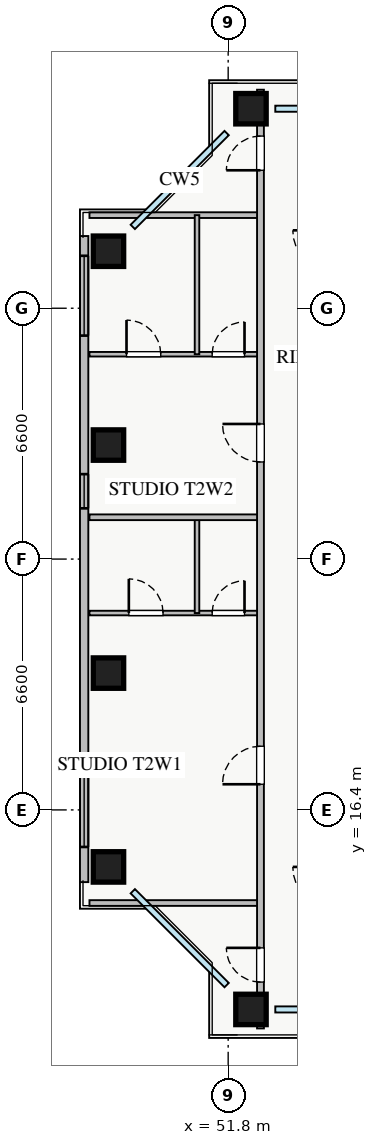
"""IFC4 building model, lengths in metres.
Left out: names, types, materials, properties, quantities, classifications, styles, units other than length and angle.
Written with IfcOpenShell. Run it as: python <this file> out.ifc"""

import sys

from ifc_helpers import new_model, si_unit, direction, frame, frame_2d, origin, origin_2d, place, context, subcontext, project, spatial, rectangle, extrude, source, transform, mapped, element, fill, save


model = new_model("IFC4")
c1 = context("Model", 3, precision=1e-05, world=origin(), true_north=direction((0.0, 1.0)))
c2 = subcontext(c1, "Body", "Model", "MODEL_VIEW")
j1 = project(units=[si_unit("LENGTHUNIT", "METRE"), si_unit("PLANEANGLEUNIT", "RADIAN")], contexts=[c1])
p1 = place(None, origin())
s1 = spatial("IfcSite", under=j1, at=p1, CompositionType="ELEMENT")
p2 = place(p1, origin())
s2 = spatial("IfcBuilding", under=s1, at=p2, CompositionType="ELEMENT")
p3 = place(p2, frame((0.0, 0.0, 97.0)))
s3 = spatial("IfcBuildingStorey", under=s2, at=p3, CompositionType="ELEMENT", Elevation=97.0)
m1 = source(origin(), c2, "Body", "SweptSolid", [
    extrude(rectangle(XDim=0.8, YDim=0.8, at=origin_2d()), origin(), (0.0, 0.0, 1.0), 3.25),
])
for number, where, z_axis, x_axis in (
    (1, (52.4, 11.15, 0.0), (0.0, 0.0, 1.0), (1.0, 0.0, 0.0)),
    (2, (52.4, 34.85, 0.0), (0.0, 0.0, 1.0), (1.0, 0.0, 0.0)),
    (3, (48.65, 14.9, 0.0), (0.0, 0.0, 1.0), (1.0, 0.0, 0.0)),
    (4, (48.65, 20.0, 0.0), (0.0, 0.0, 1.0), (1.0, 0.0, 0.0)),
    (5, (48.65, 26.0, 0.0), (0.0, 0.0, 1.0), (1.0, 0.0, 0.0)),
    (6, (48.65, 31.1, 0.0), (0.0, 0.0, 1.0), (1.0, 0.0, 0.0)),
):
    element("IfcColumn", number, at=place(p3, frame(where, z_axis=z_axis, x_axis=x_axis)), inside=s3, PredefinedType="COLUMN", context=c2, shape_type="MappedRepresentation", body=[
        mapped(m1, transform((0.0, 0.0, 0.0), x_axis=(1.0, 0.0, 0.0), y_axis=(0.0, 1.0, 0.0), z_axis=(0.0, 0.0, 1.0), scale=1.0)),
    ])
p4 = place(p3, frame((48.01, 14.5, 0.0), z_axis=(0.0, 0.0, 1.0), x_axis=(0.0, 1.0, 0.0)))
e7 = element("IfcWall", 7, at=p4, inside=s3, PredefinedType="STANDARD", context=c2, shape_type="SweptSolid", body=[
    extrude(rectangle(XDim=17.0, YDim=0.22, at=frame_2d((8.5, 0.0))), origin(), (0.0, 0.0, 1.0), 2.61),
])
p5 = place(p4, frame((0.925, 0.0, 0.9)))
e8 = element("IfcOpeningElement", 8, at=p5, cuts=e7, PredefinedType="OPENING", context=c2, shape_type="SweptSolid", body=[
    extrude(rectangle(XDim=2.4, YDim=1.48, at=frame_2d((1.2, 0.74))), frame((0.0, 0.12, 0.0), z_axis=(0.0, -1.0, 0.0), x_axis=(1.0, 0.0, 0.0)), (0.0, 0.0, 1.0), 0.24),
])
p6 = place(p4, frame((14.38, 0.0, 0.9)))
e9 = element("IfcOpeningElement", 9, at=p6, cuts=e7, PredefinedType="OPENING", context=c2, shape_type="SweptSolid", body=[
    extrude(rectangle(XDim=2.1, YDim=1.5, at=frame_2d((1.05, 0.75))), frame((0.0, 0.12, 0.0), z_axis=(0.0, -1.0, 0.0), x_axis=(1.0, 0.0, 0.0)), (0.0, 0.0, 1.0), 0.24),
])
p7 = place(p4, frame((9.835, 0.0, 0.9)))
e10 = element("IfcOpeningElement", 10, at=p7, cuts=e7, PredefinedType="OPENING", context=c2, shape_type="SweptSolid", body=[
    extrude(rectangle(XDim=0.9, YDim=1.2, at=frame_2d((0.45, 0.6))), frame((0.0, 0.12, 0.0), z_axis=(0.0, -1.0, 0.0), x_axis=(1.0, 0.0, 0.0)), (0.0, 0.0, 1.0), 0.24),
])
for number, where, z_axis, x_axis in (
    (11, (48.15, 32.05, 0.0), (0.0, 0.0, 1.0), (1.0, 0.0, 0.0)),
    (12, (48.15, 13.95, 0.0), (0.0, 0.0, 1.0), (1.0, 0.0, 0.0)),
):
    element("IfcWall", number, at=place(p3, frame(where, z_axis=z_axis, x_axis=x_axis)), inside=s3, PredefinedType="PARTITIONING", context=c2, shape_type="SweptSolid", body=[
        extrude(rectangle(XDim=4.5, YDim=0.15, at=frame_2d((2.25, 0.0))), origin(), (0.0, 0.0, 1.0), 3.07),
    ])
p8 = place(p3, frame((48.15, 21.58, 0.0), z_axis=(0.0, 0.0, 1.0), x_axis=(1.0, 0.0, 0.0)))
e13 = element("IfcWall", 13, at=p8, inside=s3, PredefinedType="PLUMBINGWALL", context=c2, shape_type="SweptSolid", body=[
    extrude(rectangle(XDim=4.5, YDim=0.12, at=frame_2d((2.25, 0.0))), origin(), (0.0, 0.0, 1.0), 3.07),
])
p9 = place(p8, frame((1.036, 0.0, 0.0)))
e14 = element("IfcOpeningElement", 14, at=p9, cuts=e13, PredefinedType="OPENING", context=c2, shape_type="SweptSolid", body=[
    extrude(rectangle(XDim=0.9, YDim=2.05, at=frame_2d((0.45, 1.025))), frame((0.0, 0.07, 0.0), z_axis=(0.0, -1.0, 0.0), x_axis=(1.0, 0.0, 0.0)), (0.0, 0.0, 1.0), 0.14),
])
p10 = place(p8, frame((3.23, 0.0, 0.0)))
e15 = element("IfcOpeningElement", 15, at=p10, cuts=e13, PredefinedType="OPENING", context=c2, shape_type="SweptSolid", body=[
    extrude(rectangle(XDim=0.85, YDim=2.05, at=frame_2d((0.425, 1.025))), frame((0.0, 0.07, 0.0), z_axis=(0.0, -1.0, 0.0), x_axis=(1.0, 0.0, 0.0)), (0.0, 0.0, 1.0), 0.14),
])
p11 = place(p3, frame((50.98, 21.58, 0.0), z_axis=(0.0, 0.0, 1.0), x_axis=(0.0, 1.0, 0.0)))
e16 = element("IfcWall", 16, at=p11, inside=s3, PredefinedType="PLUMBINGWALL", context=c2, shape_type="SweptSolid", body=[
    extrude(rectangle(XDim=2.52, YDim=0.12, at=frame_2d((1.26, 0.0))), origin(), (0.0, 0.0, 1.0), 3.07),
])
p12 = place(p3, frame((48.15, 28.39, 0.0), z_axis=(0.0, 0.0, 1.0), x_axis=(1.0, 0.0, 0.0)))
e17 = element("IfcWall", 17, at=p12, inside=s3, PredefinedType="PLUMBINGWALL", context=c2, shape_type="SweptSolid", body=[
    extrude(rectangle(XDim=4.5, YDim=0.12, at=frame_2d((2.25, 0.0))), origin(), (0.0, 0.0, 1.0), 3.07),
])
p13 = place(p12, frame((0.975, 0.0, 0.0)))
e18 = element("IfcOpeningElement", 18, at=p13, cuts=e17, PredefinedType="OPENING", context=c2, shape_type="SweptSolid", body=[
    extrude(rectangle(XDim=0.9, YDim=2.05, at=frame_2d((0.45, 1.025))), frame((0.0, 0.07, 0.0), z_axis=(0.0, -1.0, 0.0), x_axis=(1.0, 0.0, 0.0)), (0.0, 0.0, 1.0), 0.14),
])
p14 = place(p12, frame((3.23, 0.0, 0.0)))
e19 = element("IfcOpeningElement", 19, at=p14, cuts=e17, PredefinedType="OPENING", context=c2, shape_type="SweptSolid", body=[
    extrude(rectangle(XDim=0.85, YDim=2.05, at=frame_2d((0.425, 1.025))), frame((0.0, 0.07, 0.0), z_axis=(0.0, -1.0, 0.0), x_axis=(1.0, 0.0, 0.0)), (0.0, 0.0, 1.0), 0.14),
])
p15 = place(p3, frame((50.98, 28.39, 0.0), z_axis=(0.0, 0.0, 1.0), x_axis=(0.0, 1.0, 0.0)))
e20 = element("IfcWall", 20, at=p15, inside=s3, PredefinedType="PLUMBINGWALL", context=c2, shape_type="SweptSolid", body=[
    extrude(rectangle(XDim=3.66, YDim=0.12, at=frame_2d((1.83, 0.0))), origin(), (0.0, 0.0, 1.0), 3.07),
])
p16 = place(p3, frame((48.15, 24.1, 0.0), z_axis=(0.0, 0.0, 1.0), x_axis=(1.0, 0.0, 0.0)))
e21 = element("IfcWall", 21, at=p16, inside=s3, PredefinedType="PARTITIONING", context=c2, shape_type="SweptSolid", body=[
    extrude(rectangle(XDim=4.5, YDim=0.15, at=frame_2d((2.25, 0.0))), origin(), (0.0, 0.0, 1.0), 3.07),
])
p17 = place(p3, frame((52.65, 10.65, 0.0), z_axis=(0.0, 0.0, 1.0), x_axis=(0.0, 1.0, 0.0)))
e22 = element("IfcWall", 22, at=p17, inside=s3, PredefinedType="PARTITIONING", context=c2, shape_type="SweptSolid", body=[
    extrude(rectangle(XDim=24.7, YDim=0.18, at=frame_2d((12.35, 0.0))), origin(), (0.0, 0.0, 1.0), 2.615),
])
p18 = place(p17, frame((22.58, 0.0, 0.0)))
e23 = element("IfcOpeningElement", 23, at=p18, cuts=e22, PredefinedType="OPENING", context=c2, shape_type="SweptSolid", body=[
    extrude(rectangle(XDim=0.9, YDim=2.05, at=frame_2d((0.45, 1.025))), frame((0.0, 0.1, 0.0), z_axis=(0.0, -1.0, 0.0), x_axis=(1.0, 0.0, 0.0)), (0.0, 0.0, 1.0), 0.2),
])
p19 = place(p17, frame((1.22, 0.0, 0.0)))
e24 = element("IfcOpeningElement", 24, at=p19, cuts=e22, PredefinedType="OPENING", context=c2, shape_type="SweptSolid", body=[
    extrude(rectangle(XDim=0.9, YDim=2.05, at=frame_2d((0.45, 1.025))), frame((0.0, 0.1, 0.0), z_axis=(0.0, -1.0, 0.0), x_axis=(1.0, 0.0, 0.0)), (0.0, 0.0, 1.0), 0.2),
])
p20 = place(p17, frame((6.425, 0.0, 0.0)))
e25 = element("IfcOpeningElement", 25, at=p20, cuts=e22, PredefinedType="OPENING", context=c2, shape_type="SweptSolid", body=[
    extrude(rectangle(XDim=1.0, YDim=2.05, at=frame_2d((0.5, 1.025))), frame((0.0, 0.1, 0.0), z_axis=(0.0, -1.0, 0.0), x_axis=(1.0, 0.0, 0.0)), (0.0, 0.0, 1.0), 0.2),
])
p21 = place(p17, frame((14.905, 0.0, 0.0)))
e26 = element("IfcOpeningElement", 26, at=p21, cuts=e22, PredefinedType="OPENING", context=c2, shape_type="SweptSolid", body=[
    extrude(rectangle(XDim=1.0, YDim=2.05, at=frame_2d((0.5, 1.025))), frame((0.0, 0.1, 0.0), z_axis=(0.0, -1.0, 0.0), x_axis=(1.0, 0.0, 0.0)), (0.0, 0.0, 1.0), 0.2),
])
m2 = source(origin(), c2, "Body", "SweptSolid", [
    extrude(rectangle(XDim=2.4, YDim=1.48, at=frame_2d((1.2, 0.74))), frame((0.0, 0.03, 0.0), z_axis=(0.0, -1.0, 0.0), x_axis=(1.0, 0.0, 0.0)), (0.0, 0.0, 1.0), 0.06),
])
p22 = place(p5, origin())
e27 = element("IfcWindow", 27, at=p22, inside=s3, PartitioningType="TRIPLE_PANEL_VERTICAL", PredefinedType="WINDOW", context=c2, shape_type="MappedRepresentation", body=[
    mapped(m2, transform((0.0, 0.0, 0.0), x_axis=(1.0, 0.0, 0.0), y_axis=(0.0, 1.0, 0.0), z_axis=(0.0, 0.0, 1.0), scale=1.0)),
])
fill(e8, e27)
m3 = source(origin(), c2, "Body", "SweptSolid", [
    extrude(rectangle(XDim=2.1, YDim=1.5, at=frame_2d((1.05, 0.75))), frame((0.0, 0.03, 0.0), z_axis=(0.0, -1.0, 0.0), x_axis=(1.0, 0.0, 0.0)), (0.0, 0.0, 1.0), 0.06),
])
p23 = place(p6, origin())
e28 = element("IfcWindow", 28, at=p23, inside=s3, PartitioningType="TRIPLE_PANEL_VERTICAL", PredefinedType="WINDOW", context=c2, shape_type="MappedRepresentation", body=[
    mapped(m3, transform((0.0, 0.0, 0.0), x_axis=(1.0, 0.0, 0.0), y_axis=(0.0, 1.0, 0.0), z_axis=(0.0, 0.0, 1.0), scale=1.0)),
])
fill(e9, e28)
m4 = source(origin(), c2, "Body", "SweptSolid", [
    extrude(rectangle(XDim=0.9, YDim=2.05, at=frame_2d((0.45, 1.025))), frame((0.0, 0.025, 0.0), z_axis=(0.0, -1.0, 0.0), x_axis=(1.0, 0.0, 0.0)), (0.0, 0.0, 1.0), 0.05),
])
p24 = place(p9, origin())
e29 = element("IfcDoor", 29, at=p24, inside=s3, OperationType="SINGLE_SWING_LEFT", PredefinedType="DOOR", context=c2, shape_type="MappedRepresentation", body=[
    mapped(m4, transform((0.0, 0.0, 0.0), x_axis=(1.0, 0.0, 0.0), y_axis=(0.0, 1.0, 0.0), z_axis=(0.0, 0.0, 1.0), scale=1.0)),
])
fill(e14, e29)
m5 = source(origin(), c2, "Body", "SweptSolid", [
    extrude(rectangle(XDim=0.85, YDim=2.05, at=frame_2d((0.425, 1.025))), frame((0.0, 0.025, 0.0), z_axis=(0.0, -1.0, 0.0), x_axis=(1.0, 0.0, 0.0)), (0.0, 0.0, 1.0), 0.05),
])
p25 = place(p10, origin())
e30 = element("IfcDoor", 30, at=p25, inside=s3, OperationType="SINGLE_SWING_RIGHT", PredefinedType="DOOR", context=c2, shape_type="MappedRepresentation", body=[
    mapped(m5, transform((0.0, 0.0, 0.0), x_axis=(1.0, 0.0, 0.0), y_axis=(0.0, 1.0, 0.0), z_axis=(0.0, 0.0, 1.0), scale=1.0)),
])
fill(e15, e30)
p26 = place(p13, origin())
e31 = element("IfcDoor", 31, at=p26, inside=s3, OperationType="SINGLE_SWING_LEFT", PredefinedType="DOOR", context=c2, shape_type="MappedRepresentation", body=[
    mapped(m4, transform((0.0, 0.0, 0.0), x_axis=(1.0, 0.0, 0.0), y_axis=(0.0, 1.0, 0.0), z_axis=(0.0, 0.0, 1.0), scale=1.0)),
])
fill(e18, e31)
p27 = place(p14, origin())
e32 = element("IfcDoor", 32, at=p27, inside=s3, OperationType="SINGLE_SWING_RIGHT", PredefinedType="DOOR", context=c2, shape_type="MappedRepresentation", body=[
    mapped(m5, transform((0.0, 0.0, 0.0), x_axis=(1.0, 0.0, 0.0), y_axis=(0.0, 1.0, 0.0), z_axis=(0.0, 0.0, 1.0), scale=1.0)),
])
fill(e19, e32)
p28 = place(p18, origin())
e33 = element("IfcDoor", 33, at=p28, inside=s3, OperationType="SINGLE_SWING_LEFT", PredefinedType="DOOR", context=c2, shape_type="MappedRepresentation", body=[
    mapped(m4, transform((0.0, 0.0, 0.0), x_axis=(1.0, 0.0, 0.0), y_axis=(0.0, 1.0, 0.0), z_axis=(0.0, 0.0, 1.0), scale=1.0)),
])
fill(e23, e33)
p29 = place(p19, origin())
e34 = element("IfcDoor", 34, at=p29, inside=s3, OperationType="SINGLE_SWING_RIGHT", PredefinedType="DOOR", context=c2, shape_type="MappedRepresentation", body=[
    mapped(m4, transform((0.0, 0.0, 0.0), x_axis=(1.0, 0.0, 0.0), y_axis=(0.0, 1.0, 0.0), z_axis=(0.0, 0.0, 1.0), scale=1.0)),
])
fill(e24, e34)
m6 = source(origin(), c2, "Body", "SweptSolid", [
    extrude(rectangle(XDim=1.0, YDim=2.05, at=frame_2d((0.5, 1.025))), frame((0.0, 0.025, 0.0), z_axis=(0.0, -1.0, 0.0), x_axis=(1.0, 0.0, 0.0)), (0.0, 0.0, 1.0), 0.05),
])
p30 = place(p20, origin())
e35 = element("IfcDoor", 35, at=p30, inside=s3, OperationType="SINGLE_SWING_LEFT", PredefinedType="DOOR", context=c2, shape_type="MappedRepresentation", body=[
    mapped(m6, transform((0.0, 0.0, 0.0), x_axis=(1.0, 0.0, 0.0), y_axis=(0.0, 1.0, 0.0), z_axis=(0.0, 0.0, 1.0), scale=1.0)),
])
fill(e25, e35)
p31 = place(p21, origin())
e36 = element("IfcDoor", 36, at=p31, inside=s3, OperationType="SINGLE_SWING_RIGHT", PredefinedType="DOOR", context=c2, shape_type="MappedRepresentation", body=[
    mapped(m6, transform((0.0, 0.0, 0.0), x_axis=(1.0, 0.0, 0.0), y_axis=(0.0, 1.0, 0.0), z_axis=(0.0, 0.0, 1.0), scale=1.0)),
])
fill(e26, e36)
m7 = source(origin(), c2, "Body", "SweptSolid", [
    extrude(rectangle(XDim=0.9, YDim=1.2, at=frame_2d((0.45, 0.6))), frame((0.0, 0.03, 0.0), z_axis=(0.0, -1.0, 0.0), x_axis=(1.0, 0.0, 0.0)), (0.0, 0.0, 1.0), 0.06),
])
p32 = place(p7, origin())
e37 = element("IfcWindow", 37, at=p32, inside=s3, PartitioningType="SINGLE_PANEL", PredefinedType="WINDOW", context=c2, shape_type="MappedRepresentation", body=[
    mapped(m7, transform((0.0, 0.0, 0.0), x_axis=(1.0, 0.0, 0.0), y_axis=(0.0, 1.0, 0.0), z_axis=(0.0, 0.0, 1.0), scale=1.0)),
])
fill(e10, e37)
save(model, sys.argv[1])
